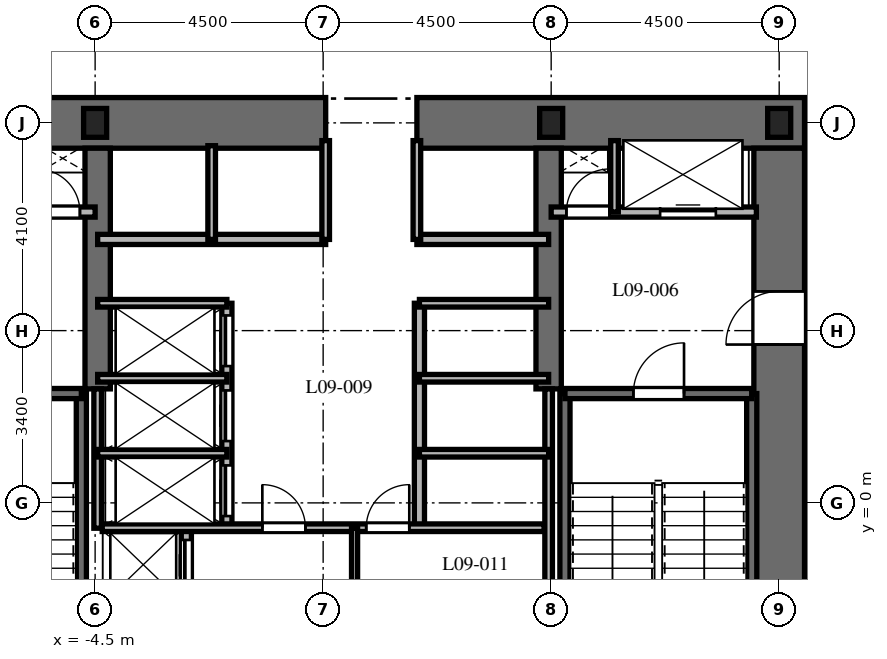
"""IFC4 building model, lengths in metres.
Left out: names, types, materials, properties, quantities, classifications, styles, units other than length and angle.
Written with IfcOpenShell. Run it as: python <this file> out.ifc"""

import sys

from ifc_helpers import new_model, si_unit, direction, frame, frame_2d, origin, origin_2d, place, context, subcontext, project, spatial, rectangle, i_section, extrude, element, fill, save


model = new_model("IFC4")
c1 = context("Model", 3, precision=1e-05, world=origin(), true_north=direction((0.0, 1.0)))
c2 = subcontext(c1, "Body", "Model", "MODEL_VIEW")
j1 = project(units=[si_unit("LENGTHUNIT", "METRE"), si_unit("PLANEANGLEUNIT", "RADIAN")], contexts=[c1])
p1 = place(None, origin())
s1 = spatial("IfcSite", under=j1, at=p1, CompositionType="ELEMENT")
p2 = place(p1, origin())
s2 = spatial("IfcBuilding", under=s1, at=p2, CompositionType="ELEMENT")
p3 = place(p2, frame((0.0, 0.0, 45.3)))
s3 = spatial("IfcBuildingStorey", under=s2, at=p3, CompositionType="ELEMENT", Elevation=45.3)
p4 = place(p3, frame((-9.5, 7.5, 0.0), z_axis=(0.0, 0.0, 1.0), x_axis=(1.0, 0.0, 0.0)))
e1 = element("IfcWall", 1, at=p4, inside=s3, PredefinedType="SHEAR", context=c2, shape_type="SweptSolid", body=[
    extrude(rectangle(XDim=9.55, YDim=1.0, at=frame_2d((4.775, 0.0))), origin(), (0.0, 0.0, 1.0), 3.7),
])
p5 = place(p3, frame((1.85, 7.5, 0.0), z_axis=(0.0, 0.0, 1.0), x_axis=(1.0, 0.0, 0.0)))
e2 = element("IfcWall", 2, at=p5, inside=s3, PredefinedType="SHEAR", context=c2, shape_type="SweptSolid", body=[
    extrude(rectangle(XDim=7.65, YDim=1.0, at=frame_2d((3.825, 0.0))), origin(), (0.0, 0.0, 1.0), 3.7),
])
p6 = place(p3, frame((9.0, -7.0, 0.0), z_axis=(0.0, 0.0, 1.0), x_axis=(0.0, 1.0, 0.0)))
e3 = element("IfcWall", 3, at=p6, inside=s3, PredefinedType="SHEAR", context=c2, shape_type="SweptSolid", body=[
    extrude(rectangle(XDim=14.0, YDim=1.0, at=frame_2d((7.0, 0.0))), origin(), (0.0, 0.0, 1.0), 3.7),
])
p7 = place(p6, frame((10.125, 0.0, 0.0)))
e4 = element("IfcOpeningElement", 4, at=p7, cuts=e3, PredefinedType="OPENING", context=c2, shape_type="SweptSolid", body=[
    extrude(rectangle(XDim=1.05, YDim=2.15, at=frame_2d((0.525, 1.075))), frame((0.0, 0.51, 0.0), z_axis=(0.0, -1.0, 0.0), x_axis=(1.0, 0.0, 0.0)), (0.0, 0.0, 1.0), 1.02),
])
for number, where, z_axis, x_axis in (
    (5, (-4.45, 2.25, 0.0), (0.0, 0.0, 1.0), (0.0, 1.0, 0.0)),
    (6, (4.45, 2.25, 0.0), (0.0, 0.0, 1.0), (0.0, 1.0, 0.0)),
):
    element("IfcWall", number, at=place(p3, frame(where, z_axis=z_axis, x_axis=x_axis)), inside=s3, PredefinedType="SHEAR", context=c2, shape_type="SweptSolid", body=[
        extrude(rectangle(XDim=4.75, YDim=0.5, at=frame_2d((2.375, 0.0))), origin(), (0.0, 0.0, 1.0), 3.7),
    ])
p8 = place(p3, frame((-4.772, -6.985, 0.0), z_axis=(0.0, 0.0, 1.0), x_axis=(0.0, 1.0, 0.0)))
e7 = element("IfcWall", 7, at=p8, inside=s3, PredefinedType="SHEAR", context=c2, shape_type="SweptSolid", body=[
    extrude(rectangle(XDim=9.143, YDim=0.2, at=frame_2d((4.572, 0.0))), origin(), (0.0, 0.0, 1.0), 3.7),
])
p9 = place(p3, frame((-8.458, 2.158, 0.0), z_axis=(0.0, 0.0, 1.0), x_axis=(1.0, 0.0, 0.0)))
e8 = element("IfcWall", 8, at=p9, inside=s3, PredefinedType="SHEAR", context=c2, shape_type="SweptSolid", body=[
    extrude(rectangle(XDim=3.686, YDim=0.2, at=frame_2d((1.843, 0.0))), origin(), (0.0, 0.0, 1.0), 3.7),
])
p10 = place(p9, frame((1.3, 0.0, 0.0)))
e9 = element("IfcOpeningElement", 9, at=p10, cuts=e8, PredefinedType="OPENING", context=c2, shape_type="SweptSolid", body=[
    extrude(rectangle(XDim=1.0, YDim=2.15, at=frame_2d((0.5, 1.075))), frame((0.0, 0.11, 0.0), z_axis=(0.0, -1.0, 0.0), x_axis=(1.0, 0.0, 0.0)), (0.0, 0.0, 1.0), 0.22),
])
for number, where, z_axis, x_axis in (
    (10, (4.772, -6.985, 0.0), (0.0, 0.0, 1.0), (0.0, 1.0, 0.0)),
    (11, (8.458, -6.985, 0.0), (0.0, 0.0, 1.0), (0.0, 1.0, 0.0)),
):
    element("IfcWall", number, at=place(p3, frame(where, z_axis=z_axis, x_axis=x_axis)), inside=s3, PredefinedType="SHEAR", context=c2, shape_type="SweptSolid", body=[
        extrude(rectangle(XDim=9.143, YDim=0.2, at=frame_2d((4.572, 0.0))), origin(), (0.0, 0.0, 1.0), 3.7),
    ])
p11 = place(p3, frame((4.772, 2.158, 0.0), z_axis=(0.0, 0.0, 1.0), x_axis=(1.0, 0.0, 0.0)))
e12 = element("IfcWall", 12, at=p11, inside=s3, PredefinedType="SHEAR", context=c2, shape_type="SweptSolid", body=[
    extrude(rectangle(XDim=3.686, YDim=0.2, at=frame_2d((1.843, 0.0))), origin(), (0.0, 0.0, 1.0), 3.7),
])
p12 = place(p11, frame((1.35, 0.0, 0.0)))
e13 = element("IfcOpeningElement", 13, at=p12, cuts=e12, PredefinedType="OPENING", context=c2, shape_type="SweptSolid", body=[
    extrude(rectangle(XDim=1.0, YDim=2.15, at=frame_2d((0.5, 1.075))), frame((0.0, 0.11, 0.0), z_axis=(0.0, -1.0, 0.0), x_axis=(1.0, 0.0, 0.0)), (0.0, 0.0, 1.0), 0.22),
])
for number, where, z_axis, x_axis in (
    (14, (9.0, 7.5, 0.0), (0.0, 0.0, 1.0), (1.0, 0.0, 0.0)),
    (15, (4.5, 7.5, 0.0), (0.0, 0.0, 1.0), (1.0, 0.0, 0.0)),
    (16, (-4.5, 7.5, 0.0), (0.0, 0.0, 1.0), (1.0, 0.0, 0.0)),
):
    element("IfcColumn", number, at=place(p3, frame(where, z_axis=z_axis, x_axis=x_axis)), inside=s3, PredefinedType="COLUMN", context=c2, shape_type="SweptSolid", body=[
        extrude(i_section(OverallWidth=0.454, OverallDepth=0.569, WebThickness=0.078, FlangeThickness=0.125, at=origin_2d()), origin(), (0.0, 0.0, 1.0), 3.7),
    ])
p13 = place(p3, frame((-8.55, 5.74, 0.0), z_axis=(0.0, 0.0, 1.0), x_axis=(1.0, 0.0, 0.0)))
e17 = element("IfcWall", 17, at=p13, inside=s3, PredefinedType="PARTITIONING", context=c2, shape_type="SweptSolid", body=[
    extrude(rectangle(XDim=4.05, YDim=0.2, at=frame_2d((2.025, 0.0))), origin(), (0.0, 0.0, 1.0), 3.4),
])
p14 = place(p13, frame((0.75, 0.0, 0.0)))
e18 = element("IfcOpeningElement", 18, at=p14, cuts=e17, PredefinedType="OPENING", context=c2, shape_type="SweptSolid", body=[
    extrude(rectangle(XDim=1.1, YDim=2.2, at=frame_2d((0.55, 1.1))), frame((0.0, 0.11, 0.0), z_axis=(0.0, -1.0, 0.0), x_axis=(1.0, 0.0, 0.0)), (0.0, 0.0, 1.0), 0.22),
])
p15 = place(p13, frame((2.9, 0.0, 0.0)))
e19 = element("IfcOpeningElement", 19, at=p15, cuts=e17, PredefinedType="OPENING", context=c2, shape_type="SweptSolid", body=[
    extrude(rectangle(XDim=0.85, YDim=2.03, at=frame_2d((0.425, 1.015))), frame((0.0, 0.11, 0.0), z_axis=(0.0, -1.0, 0.0), x_axis=(1.0, 0.0, 0.0)), (0.0, 0.0, 1.0), 0.22),
])
p16 = place(p3, frame((4.5, 5.74, 0.0), z_axis=(0.0, 0.0, 1.0), x_axis=(1.0, 0.0, 0.0)))
e20 = element("IfcWall", 20, at=p16, inside=s3, PredefinedType="PARTITIONING", context=c2, shape_type="SweptSolid", body=[
    extrude(rectangle(XDim=4.05, YDim=0.2, at=frame_2d((2.025, 0.0))), origin(), (0.0, 0.0, 1.0), 3.4),
])
p17 = place(p16, frame((0.3, 0.0, 0.0)))
e21 = element("IfcOpeningElement", 21, at=p17, cuts=e20, PredefinedType="OPENING", context=c2, shape_type="SweptSolid", body=[
    extrude(rectangle(XDim=0.85, YDim=2.03, at=frame_2d((0.425, 1.015))), frame((0.0, 0.11, 0.0), z_axis=(0.0, -1.0, 0.0), x_axis=(1.0, 0.0, 0.0)), (0.0, 0.0, 1.0), 0.22),
])
p18 = place(p16, frame((2.15, 0.0, 0.0)))
e22 = element("IfcOpeningElement", 22, at=p18, cuts=e20, PredefinedType="OPENING", context=c2, shape_type="SweptSolid", body=[
    extrude(rectangle(XDim=1.1, YDim=2.2, at=frame_2d((0.55, 1.1))), frame((0.0, 0.11, 0.0), z_axis=(0.0, -1.0, 0.0), x_axis=(1.0, 0.0, 0.0)), (0.0, 0.0, 1.0), 0.22),
])
p19 = place(p3, frame((5.75, 5.74, 0.0), z_axis=(0.0, 0.0, 1.0), x_axis=(0.0, 1.0, 0.0)))
e23 = element("IfcWall", 23, at=p19, inside=s3, PredefinedType="PARTITIONING", context=c2, shape_type="SweptSolid", body=[
    extrude(rectangle(XDim=1.41, YDim=0.15, at=frame_2d((0.705, 0.0))), origin(), (0.0, 0.0, 1.0), 3.4),
])
p20 = place(p3, frame((-2.7, -1.972, 0.0), z_axis=(0.0, 0.0, 1.0), x_axis=(0.0, 1.0, 0.0)))
e24 = element("IfcWall", 24, at=p20, inside=s3, PredefinedType="PARTITIONING", context=c2, shape_type="SweptSolid", body=[
    extrude(rectangle(XDim=1.472, YDim=0.2, at=frame_2d((0.736, 0.0))), origin(), (0.0, 0.0, 1.0), 3.4),
])
p21 = place(p20, frame((0.24, 0.0, 0.0)))
e25 = element("IfcOpeningElement", 25, at=p21, cuts=e24, PredefinedType="OPENING", context=c2, shape_type="SweptSolid", body=[
    extrude(rectangle(XDim=1.0, YDim=2.2, at=frame_2d((0.5, 1.1))), frame((0.0, 0.11, 0.0), z_axis=(0.0, -1.0, 0.0), x_axis=(1.0, 0.0, 0.0)), (0.0, 0.0, 1.0), 0.22),
])
p22 = place(p3, frame((-4.45, 5.2, 0.0), z_axis=(0.0, 0.0, 1.0), x_axis=(1.0, 0.0, 0.0)))
e26 = element("IfcWall", 26, at=p22, inside=s3, PredefinedType="PARTITIONING", context=c2, shape_type="SweptSolid", body=[
    extrude(rectangle(XDim=4.5, YDim=0.2, at=frame_2d((2.25, 0.0))), origin(), (0.0, 0.0, 1.0), 3.4),
])
p23 = place(p3, frame((1.85, 5.2, 0.0), z_axis=(0.0, 0.0, 1.0), x_axis=(1.0, 0.0, 0.0)))
e27 = element("IfcWall", 27, at=p23, inside=s3, PredefinedType="PARTITIONING", context=c2, shape_type="SweptSolid", body=[
    extrude(rectangle(XDim=2.6, YDim=0.2, at=frame_2d((1.3, 0.0))), origin(), (0.0, 0.0, 1.0), 3.4),
])
p24 = place(p3, frame((-2.2, 5.2, 0.0), z_axis=(0.0, 0.0, 1.0), x_axis=(0.0, 1.0, 0.0)))
e28 = element("IfcWall", 28, at=p24, inside=s3, PredefinedType="PARTITIONING", context=c2, shape_type="SweptSolid", body=[
    extrude(rectangle(XDim=1.85, YDim=0.15, at=frame_2d((0.925, 0.0))), origin(), (0.0, 0.0, 1.0), 3.4),
])
for number, where, z_axis, x_axis in (
    (29, (0.05, 5.2, 0.0), (0.0, 0.0, 1.0), (0.0, 1.0, 0.0)),
    (30, (1.85, 5.2, 0.0), (0.0, 0.0, 1.0), (0.0, 1.0, 0.0)),
):
    element("IfcWall", number, at=place(p3, frame(where, z_axis=z_axis, x_axis=x_axis)), inside=s3, PredefinedType="PARTITIONING", context=c2, shape_type="SweptSolid", body=[
        extrude(rectangle(XDim=1.95, YDim=0.15, at=frame_2d((0.975, 0.0))), origin(), (0.0, 0.0, 1.0), 3.4),
    ])
p25 = place(p3, frame((-4.45, -0.5, 0.0), z_axis=(0.0, 0.0, 1.0), x_axis=(0.0, 1.0, 0.0)))
e31 = element("IfcWall", 31, at=p25, inside=s3, PredefinedType="PARTITIONING", context=c2, shape_type="SweptSolid", body=[
    extrude(rectangle(XDim=2.75, YDim=0.15, at=frame_2d((1.375, 0.0))), origin(), (0.0, 0.0, 1.0), 3.4),
])
p26 = place(p3, frame((4.45, -1.972, 0.0), z_axis=(0.0, 0.0, 1.0), x_axis=(0.0, 1.0, 0.0)))
e32 = element("IfcWall", 32, at=p26, inside=s3, PredefinedType="PARTITIONING", context=c2, shape_type="SweptSolid", body=[
    extrude(rectangle(XDim=4.222, YDim=0.15, at=frame_2d((2.111, 0.0))), origin(), (0.0, 0.0, 1.0), 3.4),
])
p27 = place(p3, frame((-1.9, -0.5, 0.0), z_axis=(0.0, 0.0, 1.0), x_axis=(0.0, 1.0, 0.0)))
e33 = element("IfcWall", 33, at=p27, inside=s3, PredefinedType="PARTITIONING", context=c2, shape_type="SweptSolid", body=[
    extrude(rectangle(XDim=4.44, YDim=0.2, at=frame_2d((2.22, 0.0))), origin(), (0.0, 0.0, 1.0), 3.4),
])
p28 = place(p27, frame((0.24, 0.0, 0.0)))
e34 = element("IfcOpeningElement", 34, at=p28, cuts=e33, PredefinedType="OPENING", context=c2, shape_type="SweptSolid", body=[
    extrude(rectangle(XDim=1.0, YDim=2.2, at=frame_2d((0.5, 1.1))), frame((0.0, 0.11, 0.0), z_axis=(0.0, -1.0, 0.0), x_axis=(1.0, 0.0, 0.0)), (0.0, 0.0, 1.0), 0.22),
])
p29 = place(p27, frame((1.72, 0.0, 0.0)))
e35 = element("IfcOpeningElement", 35, at=p29, cuts=e33, PredefinedType="OPENING", context=c2, shape_type="SweptSolid", body=[
    extrude(rectangle(XDim=1.0, YDim=2.2, at=frame_2d((0.5, 1.1))), frame((0.0, 0.11, 0.0), z_axis=(0.0, -1.0, 0.0), x_axis=(1.0, 0.0, 0.0)), (0.0, 0.0, 1.0), 0.22),
])
p30 = place(p27, frame((3.2, 0.0, 0.0)))
e36 = element("IfcOpeningElement", 36, at=p30, cuts=e33, PredefinedType="OPENING", context=c2, shape_type="SweptSolid", body=[
    extrude(rectangle(XDim=1.0, YDim=2.2, at=frame_2d((0.5, 1.1))), frame((0.0, 0.11, 0.0), z_axis=(0.0, -1.0, 0.0), x_axis=(1.0, 0.0, 0.0)), (0.0, 0.0, 1.0), 0.22),
])
for number, where, z_axis, x_axis in (
    (37, (-4.45, 3.94, 0.0), (0.0, 0.0, 1.0), (1.0, 0.0, 0.0)),
    (38, (-4.45, 0.98, 0.0), (0.0, 0.0, 1.0), (1.0, 0.0, 0.0)),
    (39, (-4.45, 2.46, 0.0), (0.0, 0.0, 1.0), (1.0, 0.0, 0.0)),
):
    element("IfcWall", number, at=place(p3, frame(where, z_axis=z_axis, x_axis=x_axis)), inside=s3, PredefinedType="PARTITIONING", context=c2, shape_type="SweptSolid", body=[
        extrude(rectangle(XDim=2.55, YDim=0.15, at=frame_2d((1.275, 0.0))), origin(), (0.0, 0.0, 1.0), 3.4),
    ])
p31 = place(p3, frame((1.9, -0.5, 0.0), z_axis=(0.0, 0.0, 1.0), x_axis=(0.0, 1.0, 0.0)))
e40 = element("IfcWall", 40, at=p31, inside=s3, PredefinedType="PARTITIONING", context=c2, shape_type="SweptSolid", body=[
    extrude(rectangle(XDim=4.44, YDim=0.2, at=frame_2d((2.22, 0.0))), origin(), (0.0, 0.0, 1.0), 3.4),
])
for number, where, z_axis, x_axis in (
    (41, (1.9, 3.94, 0.0), (0.0, 0.0, 1.0), (1.0, 0.0, 0.0)),
    (42, (1.9, 0.98, 0.0), (0.0, 0.0, 1.0), (1.0, 0.0, 0.0)),
    (43, (1.9, 2.46, 0.0), (0.0, 0.0, 1.0), (1.0, 0.0, 0.0)),
):
    element("IfcWall", number, at=place(p3, frame(where, z_axis=z_axis, x_axis=x_axis)), inside=s3, PredefinedType="PARTITIONING", context=c2, shape_type="SweptSolid", body=[
        extrude(rectangle(XDim=2.55, YDim=0.15, at=frame_2d((1.275, 0.0))), origin(), (0.0, 0.0, 1.0), 3.4),
    ])
p32 = place(p3, frame((-4.36, -0.49, 0.0), z_axis=(0.0, 0.0, 1.0), x_axis=(1.0, 0.0, 0.0)))
e44 = element("IfcWall", 44, at=p32, inside=s3, PredefinedType="PARTITIONING", context=c2, shape_type="SweptSolid", body=[
    extrude(rectangle(XDim=8.72, YDim=0.15, at=frame_2d((4.36, 0.0))), origin(), (0.0, 0.0, 1.0), 3.4),
])
p33 = place(p32, frame((3.16, 0.0, 0.0)))
e45 = element("IfcOpeningElement", 45, at=p33, cuts=e44, PredefinedType="OPENING", context=c2, shape_type="SweptSolid", body=[
    extrude(rectangle(XDim=0.85, YDim=2.03, at=frame_2d((0.425, 1.015))), frame((0.0, 0.085, 0.0), z_axis=(0.0, -1.0, 0.0), x_axis=(1.0, 0.0, 0.0)), (0.0, 0.0, 1.0), 0.17),
])
p34 = place(p32, frame((5.21, 0.0, 0.0)))
e46 = element("IfcOpeningElement", 46, at=p34, cuts=e44, PredefinedType="OPENING", context=c2, shape_type="SweptSolid", body=[
    extrude(rectangle(XDim=0.85, YDim=2.03, at=frame_2d((0.425, 1.015))), frame((0.0, 0.085, 0.0), z_axis=(0.0, -1.0, 0.0), x_axis=(1.0, 0.0, 0.0)), (0.0, 0.0, 1.0), 0.17),
])
p35 = place(p3, frame((0.62, -1.972, 0.0), z_axis=(0.0, 0.0, 1.0), x_axis=(0.0, 1.0, 0.0)))
e47 = element("IfcWall", 47, at=p35, inside=s3, PredefinedType="PARTITIONING", context=c2, shape_type="SweptSolid", body=[
    extrude(rectangle(XDim=1.472, YDim=0.12, at=frame_2d((0.736, 0.0))), origin(), (0.0, 0.0, 1.0), 3.4),
])
p36 = place(p12, origin())
e48 = element("IfcDoor", 48, at=p36, inside=s3, OperationType="SINGLE_SWING_RIGHT", PredefinedType="DOOR", context=c2, shape_type="SweptSolid", body=[
    extrude(rectangle(XDim=1.0, YDim=2.15, at=frame_2d((0.5, 1.075))), frame((0.0, 0.025, 0.0), z_axis=(0.0, -1.0, 0.0), x_axis=(1.0, 0.0, 0.0)), (0.0, 0.0, 1.0), 0.05),
])
fill(e13, e48)
p37 = place(p7, origin())
e49 = element("IfcDoor", 49, at=p37, inside=s3, OperationType="SINGLE_SWING_LEFT", PredefinedType="DOOR", context=c2, shape_type="SweptSolid", body=[
    extrude(rectangle(XDim=1.05, YDim=2.15, at=frame_2d((0.525, 1.075))), frame((0.0, 0.025, 0.0), z_axis=(0.0, -1.0, 0.0), x_axis=(1.0, 0.0, 0.0)), (0.0, 0.0, 1.0), 0.05),
])
fill(e4, e49)
p38 = place(p15, origin())
e50 = element("IfcDoor", 50, at=p38, inside=s3, OperationType="SINGLE_SWING_LEFT", PredefinedType="DOOR", context=c2, shape_type="SweptSolid", body=[
    extrude(rectangle(XDim=0.85, YDim=2.03, at=frame_2d((0.425, 1.015))), frame((0.0, 0.025, 0.0), z_axis=(0.0, -1.0, 0.0), x_axis=(1.0, 0.0, 0.0)), (0.0, 0.0, 1.0), 0.05),
])
fill(e19, e50)
p39 = place(p17, origin())
e51 = element("IfcDoor", 51, at=p39, inside=s3, OperationType="SINGLE_SWING_RIGHT", PredefinedType="DOOR", context=c2, shape_type="SweptSolid", body=[
    extrude(rectangle(XDim=0.85, YDim=2.03, at=frame_2d((0.425, 1.015))), frame((0.0, 0.025, 0.0), z_axis=(0.0, -1.0, 0.0), x_axis=(1.0, 0.0, 0.0)), (0.0, 0.0, 1.0), 0.05),
])
fill(e21, e51)
p40 = place(p18, origin())
e52 = element("IfcDoor", 52, at=p40, inside=s3, OperationType="SLIDING_TO_RIGHT", PredefinedType="DOOR", context=c2, shape_type="SweptSolid", body=[
    extrude(rectangle(XDim=1.1, YDim=2.2, at=frame_2d((0.55, 1.1))), frame((0.0, 0.025, 0.0), z_axis=(0.0, -1.0, 0.0), x_axis=(1.0, 0.0, 0.0)), (0.0, 0.0, 1.0), 0.05),
])
fill(e22, e52)
p41 = place(p21, origin())
e53 = element("IfcDoor", 53, at=p41, inside=s3, OperationType="SLIDING_TO_LEFT", PredefinedType="DOOR", context=c2, shape_type="SweptSolid", body=[
    extrude(rectangle(XDim=1.0, YDim=2.2, at=frame_2d((0.5, 1.1))), frame((0.0, 0.025, 0.0), z_axis=(0.0, -1.0, 0.0), x_axis=(1.0, 0.0, 0.0)), (0.0, 0.0, 1.0), 0.05),
])
fill(e25, e53)
p42 = place(p28, origin())
e54 = element("IfcDoor", 54, at=p42, inside=s3, OperationType="SLIDING_TO_LEFT", PredefinedType="DOOR", context=c2, shape_type="SweptSolid", body=[
    extrude(rectangle(XDim=1.0, YDim=2.2, at=frame_2d((0.5, 1.1))), frame((0.0, 0.025, 0.0), z_axis=(0.0, -1.0, 0.0), x_axis=(1.0, 0.0, 0.0)), (0.0, 0.0, 1.0), 0.05),
])
fill(e34, e54)
p43 = place(p29, origin())
e55 = element("IfcDoor", 55, at=p43, inside=s3, OperationType="SLIDING_TO_LEFT", PredefinedType="DOOR", context=c2, shape_type="SweptSolid", body=[
    extrude(rectangle(XDim=1.0, YDim=2.2, at=frame_2d((0.5, 1.1))), frame((0.0, 0.025, 0.0), z_axis=(0.0, -1.0, 0.0), x_axis=(1.0, 0.0, 0.0)), (0.0, 0.0, 1.0), 0.05),
])
fill(e35, e55)
p44 = place(p30, origin())
e56 = element("IfcDoor", 56, at=p44, inside=s3, OperationType="SLIDING_TO_LEFT", PredefinedType="DOOR", context=c2, shape_type="SweptSolid", body=[
    extrude(rectangle(XDim=1.0, YDim=2.2, at=frame_2d((0.5, 1.1))), frame((0.0, 0.025, 0.0), z_axis=(0.0, -1.0, 0.0), x_axis=(1.0, 0.0, 0.0)), (0.0, 0.0, 1.0), 0.05),
])
fill(e36, e56)
p45 = place(p33, origin())
e57 = element("IfcDoor", 57, at=p45, inside=s3, OperationType="SINGLE_SWING_LEFT", PredefinedType="DOOR", context=c2, shape_type="SweptSolid", body=[
    extrude(rectangle(XDim=0.85, YDim=2.03, at=frame_2d((0.425, 1.015))), frame((0.0, 0.025, 0.0), z_axis=(0.0, -1.0, 0.0), x_axis=(1.0, 0.0, 0.0)), (0.0, 0.0, 1.0), 0.05),
])
fill(e45, e57)
p46 = place(p34, origin())
e58 = element("IfcDoor", 58, at=p46, inside=s3, OperationType="SINGLE_SWING_RIGHT", PredefinedType="DOOR", context=c2, shape_type="SweptSolid", body=[
    extrude(rectangle(XDim=0.85, YDim=2.03, at=frame_2d((0.425, 1.015))), frame((0.0, 0.025, 0.0), z_axis=(0.0, -1.0, 0.0), x_axis=(1.0, 0.0, 0.0)), (0.0, 0.0, 1.0), 0.05),
])
fill(e46, e58)
save(model, sys.argv[1])
